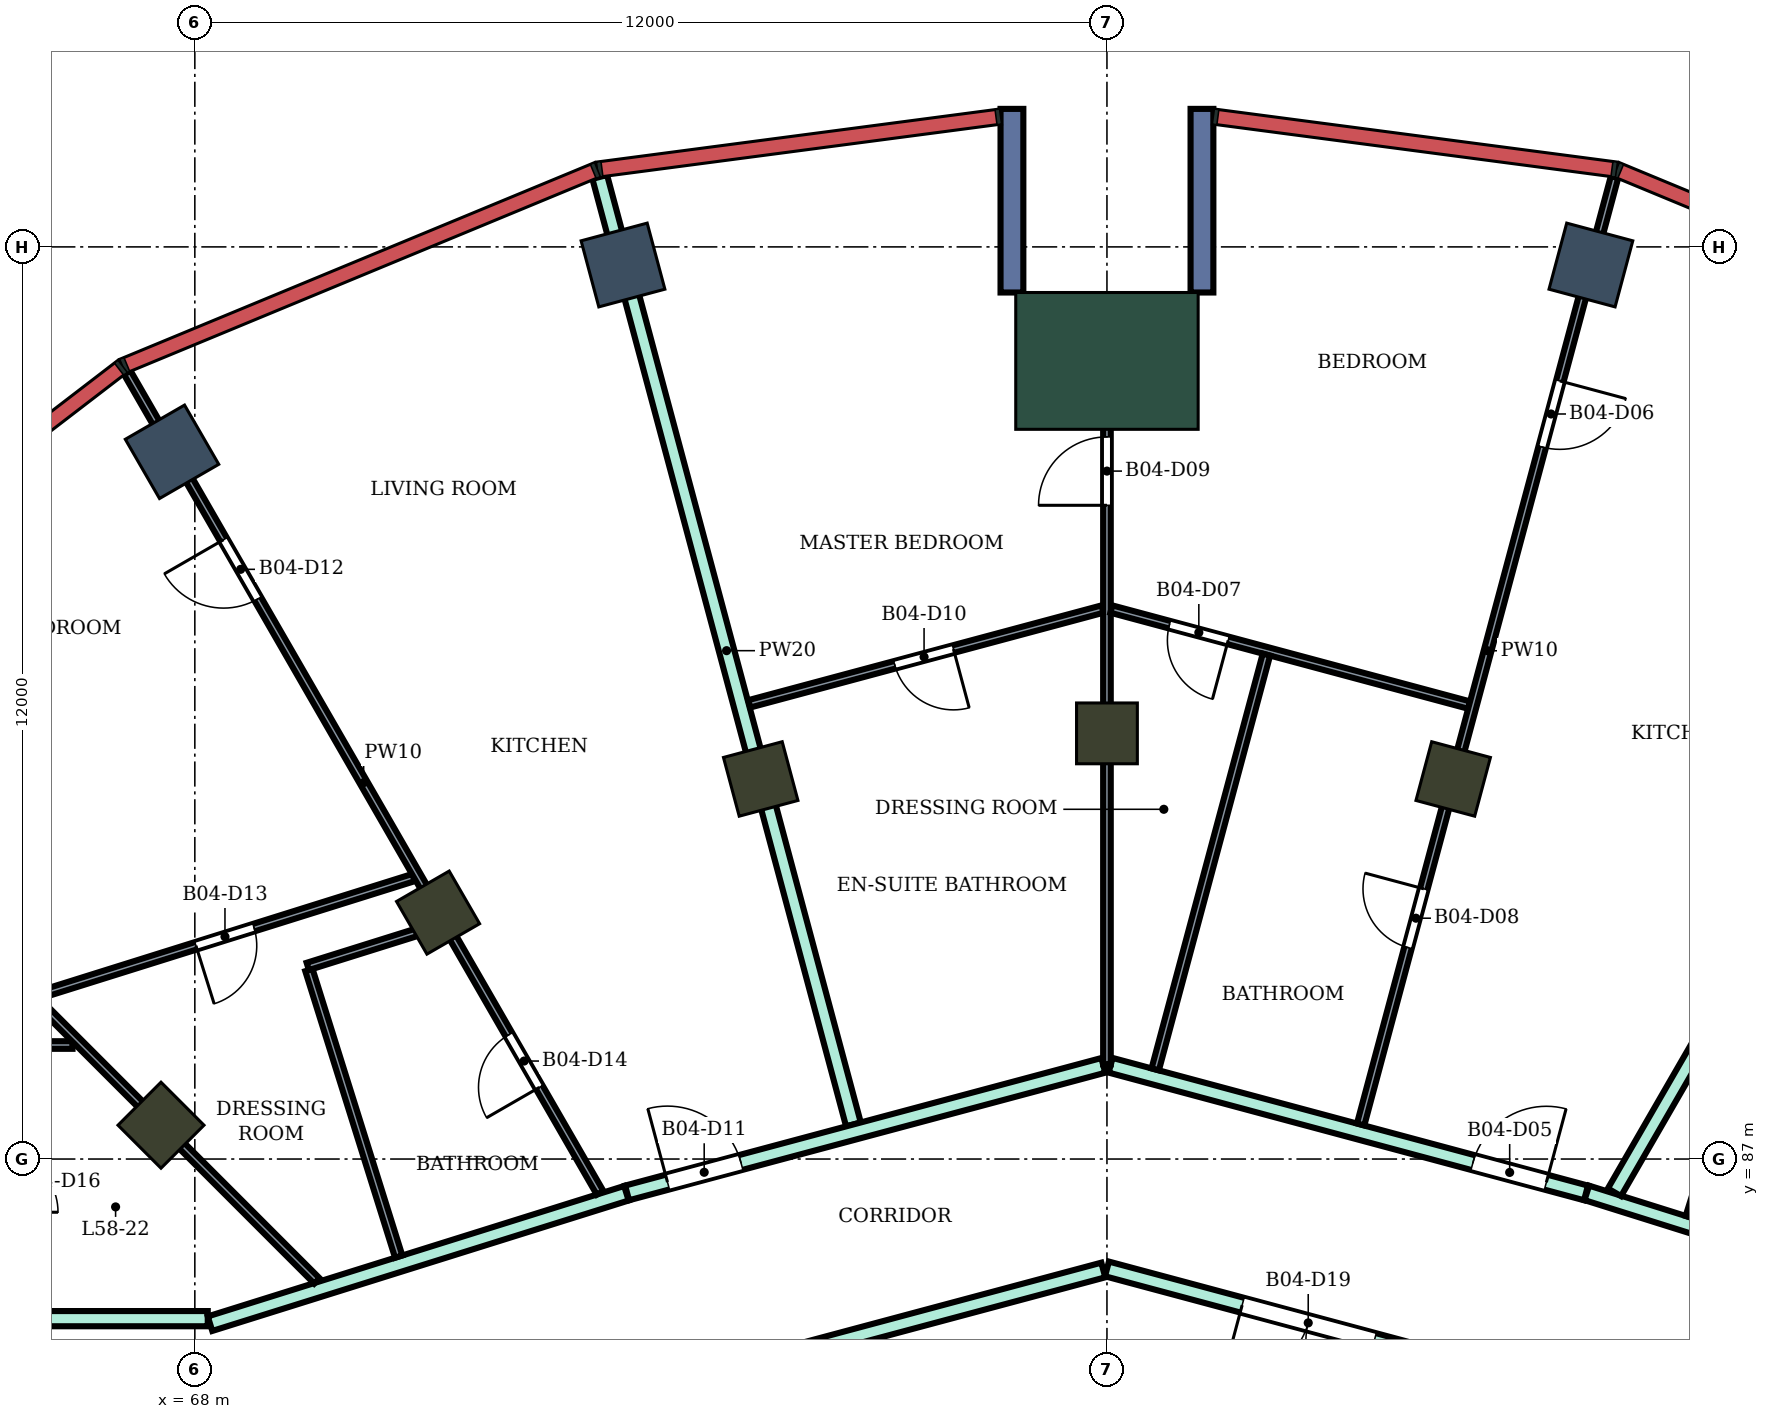
"""IFC4 building model, lengths in metres.
Left out: names, types, materials, properties, quantities, classifications, styles, units other than length and angle.
Written with IfcOpenShell. Run it as: python <this file> out.ifc"""

import sys

from ifc_helpers import new_model, si_unit, direction, frame, frame_2d, origin, origin_2d, place, context, subcontext, project, spatial, rectangle, extrude, element, fill, save


model = new_model("IFC4")
c1 = context("Model", 3, precision=1e-05, world=origin(), true_north=direction((0.0, 1.0)))
c2 = subcontext(c1, "Body", "Model", "MODEL_VIEW")
j1 = project(units=[si_unit("LENGTHUNIT", "METRE"), si_unit("PLANEANGLEUNIT", "RADIAN")], contexts=[c1])
p1 = place(None, origin())
s1 = spatial("IfcSite", under=j1, at=p1, CompositionType="ELEMENT")
p2 = place(p1, origin())
s2 = spatial("IfcBuilding", under=s1, at=p2, CompositionType="ELEMENT")
p3 = place(p2, frame((0.0, 0.0, 254.1)))
s3 = spatial("IfcBuildingStorey", under=s2, at=p3, CompositionType="ELEMENT", Elevation=254.1)
for number, where, z_axis, x_axis in (
    (1, (86.367, 98.762, 0.0), (0.0, 0.0, 1.0), (0.259, 0.966, 0.0)),
    (2, (73.633, 98.762, 0.0), (0.0, 0.0, 1.0), (-0.259, 0.966, 0.0)),
    (3, (67.7, 96.304, 0.0), (0.0, 0.0, 1.0), (-0.5, 0.866, 0.0)),
):
    element("IfcColumn", number, at=place(p3, frame(where, z_axis=z_axis, x_axis=x_axis)), inside=s3, PredefinedType="COLUMN", context=c2, shape_type="SweptSolid", body=[
        extrude(rectangle(XDim=0.9, YDim=0.9, at=origin_2d()), origin(), (0.0, 0.0, 1.0), 4.2),
    ])
for number, where, z_axis, x_axis in (
    (4, (84.555, 92.0, 0.0), (0.0, 0.0, 1.0), (0.259, 0.966, 0.0)),
    (5, (80.0, 92.6, 0.0), (0.0, 0.0, 1.0), (0.0, 1.0, 0.0)),
    (6, (75.445, 92.0, 0.0), (0.0, 0.0, 1.0), (-0.259, 0.966, 0.0)),
    (7, (71.2, 90.242, 0.0), (0.0, 0.0, 1.0), (-0.5, 0.866, 0.0)),
    (8, (67.555, 87.445, 0.0), (0.0, 0.0, 1.0), (-0.707, 0.707, 0.0)),
):
    element("IfcColumn", number, at=place(p3, frame(where, z_axis=z_axis, x_axis=x_axis)), inside=s3, PredefinedType="COLUMN", context=c2, shape_type="SweptSolid", body=[
        extrude(rectangle(XDim=0.8, YDim=0.8, at=origin_2d()), origin(), (0.0, 0.0, 1.0), 4.2),
    ])
p4 = place(p3, frame((80.0, 97.5, 0.0), z_axis=(0.0, 0.0, 1.0), x_axis=(0.0, 1.0, 0.0)))
e9 = element("IfcColumn", 9, at=p4, inside=s3, PredefinedType="COLUMN", context=c2, shape_type="SweptSolid", body=[
    extrude(rectangle(XDim=1.8, YDim=2.4, at=origin_2d()), origin(), (0.0, 0.0, 1.0), 4.2),
])
for number, where, z_axis, x_axis in (
    (10, (81.25, 98.4, 0.0), (0.0, 0.0, 1.0), (0.0, 1.0, 0.0)),
    (11, (78.75, 98.4, 0.0), (0.0, 0.0, 1.0), (0.0, 1.0, 0.0)),
):
    element("IfcWall", number, at=place(p3, frame(where, z_axis=z_axis, x_axis=x_axis)), inside=s3, PredefinedType="NOTDEFINED", context=c2, shape_type="SweptSolid", body=[
        extrude(rectangle(XDim=2.416, YDim=0.3, at=frame_2d((1.208, 0.0))), origin(), (0.0, 0.0, 1.0), 4.2),
    ])
p5 = place(p3, frame((65.2, 84.9, 0.0), z_axis=(0.0, 0.0, 1.0), x_axis=(1.0, 0.0, 0.0)))
e12 = element("IfcWall", 12, at=p5, inside=s3, PredefinedType="PARTITIONING", context=c2, shape_type="SweptSolid", body=[
    extrude(rectangle(XDim=2.97, YDim=0.2, at=frame_2d((1.485, 0.0))), origin(), (0.0, 0.0, 1.0), 3.75),
])
p6 = place(p3, frame((68.2, 84.834, 0.0), z_axis=(0.0, 0.0, 1.0), x_axis=(0.954260265251, 0.298977166624, 0.0)))
e13 = element("IfcWall", 13, at=p6, inside=s3, PredefinedType="PARTITIONING", context=c2, shape_type="SweptSolid", body=[
    extrude(rectangle(XDim=5.741, YDim=0.2, at=frame_2d((2.87, 0.0))), origin(), (0.0, 0.0, 1.0), 3.75),
])
p7 = place(p3, frame((73.327, 99.92, 0.0), z_axis=(0.0, 0.0, 1.0), x_axis=(0.258652861824, -0.965970339643, 0.0)))
e14 = element("IfcWall", 14, at=p7, inside=s3, PredefinedType="PARTITIONING", context=c2, shape_type="SweptSolid", body=[
    extrude(rectangle(XDim=12.904, YDim=0.2, at=frame_2d((6.452, 0.0))), origin(), (0.0, 0.0, 1.0), 3.75),
])
p8 = place(p3, frame((73.687, 86.554, 0.0), z_axis=(0.0, 0.0, 1.0), x_axis=(0.965961994098, 0.258684027257, 0.0)))
e15 = element("IfcWall", 15, at=p8, inside=s3, PredefinedType="PARTITIONING", context=c2, shape_type="SweptSolid", body=[
    extrude(rectangle(XDim=6.486, YDim=0.2, at=frame_2d((3.243, 0.0))), origin(), (0.0, 0.0, 1.0), 3.75),
])
p9 = place(p8, frame((0.55, 0.0, 0.0)))
e16 = element("IfcOpeningElement", 16, at=p9, cuts=e15, PredefinedType="OPENING", context=c2, shape_type="SweptSolid", body=[
    extrude(rectangle(XDim=1.0, YDim=2.1, at=frame_2d((0.5, 1.05))), frame((0.0, 0.11, 0.0), z_axis=(0.0, -1.0, 0.0), x_axis=(1.0, 0.0, 0.0)), (0.0, 0.0, 1.0), 0.22),
])
p10 = place(p3, frame((74.413, 84.057, 0.0), z_axis=(0.0, 0.0, 1.0), x_axis=(0.965970849692, 0.258650956976, 0.0)))
e17 = element("IfcWall", 17, at=p10, inside=s3, PredefinedType="PARTITIONING", context=c2, shape_type="SweptSolid", body=[
    extrude(rectangle(XDim=5.734, YDim=0.2, at=frame_2d((2.867, 0.0))), origin(), (0.0, 0.0, 1.0), 3.75),
])
p11 = place(p3, frame((80.0, 85.554, 0.0), z_axis=(0.0, 0.0, 1.0), x_axis=(0.965894438951, -0.258936155845, 0.0)))
e18 = element("IfcWall", 18, at=p11, inside=s3, PredefinedType="PARTITIONING", context=c2, shape_type="SweptSolid", body=[
    extrude(rectangle(XDim=5.774, YDim=0.2, at=frame_2d((2.887, 0.0))), origin(), (0.0, 0.0, 1.0), 3.75),
])
p12 = place(p11, frame((1.841, 0.0, 0.0)))
e19 = element("IfcOpeningElement", 19, at=p12, cuts=e18, PredefinedType="OPENING", context=c2, shape_type="SweptSolid", body=[
    extrude(rectangle(XDim=1.8, YDim=2.1, at=frame_2d((0.9, 1.05))), frame((0.0, 0.11, 0.0), z_axis=(0.0, -1.0, 0.0), x_axis=(1.0, 0.0, 0.0)), (0.0, 0.0, 1.0), 0.22),
])
p13 = place(p3, frame((80.048, 88.233, 0.0), z_axis=(0.0, 0.0, 1.0), x_axis=(0.965787353661, -0.259335280109, 0.0)))
e20 = element("IfcWall", 20, at=p13, inside=s3, PredefinedType="PARTITIONING", context=c2, shape_type="SweptSolid", body=[
    extrude(rectangle(XDim=6.476, YDim=0.2, at=frame_2d((3.238, 0.0))), origin(), (0.0, 0.0, 1.0), 3.75),
])
p14 = place(p13, frame((4.936, 0.0, 0.0)))
e21 = element("IfcOpeningElement", 21, at=p14, cuts=e20, PredefinedType="OPENING", context=c2, shape_type="SweptSolid", body=[
    extrude(rectangle(XDim=1.0, YDim=2.1, at=frame_2d((0.5, 1.05))), frame((0.0, 0.11, 0.0), z_axis=(0.0, -1.0, 0.0), x_axis=(1.0, 0.0, 0.0)), (0.0, 0.0, 1.0), 0.22),
])
p15 = place(p3, frame((86.313, 86.554, 0.0), z_axis=(0.0, 0.0, 1.0), x_axis=(0.954077387881, -0.29956024091, 0.0)))
e22 = element("IfcWall", 22, at=p15, inside=s3, PredefinedType="PARTITIONING", context=c2, shape_type="SweptSolid", body=[
    extrude(rectangle(XDim=5.72, YDim=0.2, at=frame_2d((2.86, 0.0))), origin(), (0.0, 0.0, 1.0), 3.75),
])
p16 = place(p3, frame((86.677, 86.562, 0.0), z_axis=(0.0, 0.0, 1.0), x_axis=(0.500139020429, 0.865945125424, 0.0)))
e23 = element("IfcWall", 23, at=p16, inside=s3, PredefinedType="PARTITIONING", context=c2, shape_type="SweptSolid", body=[
    extrude(rectangle(XDim=12.446, YDim=0.2, at=frame_2d((6.223, 0.0))), origin(), (0.0, 0.0, 1.0), 3.75),
])
p17 = place(p3, frame((58.072, 88.5, 0.0), z_axis=(0.0, 0.0, 1.0), x_axis=(1.0, 0.0, 0.0)))
e24 = element("IfcWall", 24, at=p17, inside=s3, PredefinedType="PARTITIONING", context=c2, shape_type="SweptSolid", body=[
    extrude(rectangle(XDim=8.319, YDim=0.1, at=frame_2d((4.159, 0.0))), origin(), (0.0, 0.0, 1.0), 3.75),
])
p18 = place(p17, frame((3.329, 0.0, 0.0)))
e25 = element("IfcOpeningElement", 25, at=p18, cuts=e24, PredefinedType="OPENING", context=c2, shape_type="SweptSolid", body=[
    extrude(rectangle(XDim=0.8, YDim=2.1, at=frame_2d((0.4, 1.05))), frame((0.0, 0.06, 0.0), z_axis=(0.0, -1.0, 0.0), x_axis=(1.0, 0.0, 0.0)), (0.0, 0.0, 1.0), 0.12),
])
p19 = place(p3, frame((63.597, 91.407, 0.0), z_axis=(0.0, 0.0, 1.0), x_axis=(0.70700623685, -0.707207311228, 0.0)))
e26 = element("IfcWall", 26, at=p19, inside=s3, PredefinedType="PARTITIONING", context=c2, shape_type="SweptSolid", body=[
    extrude(rectangle(XDim=8.499, YDim=0.1, at=frame_2d((4.25, 0.0))), origin(), (0.0, 0.0, 1.0), 3.75),
])
p20 = place(p19, frame((1.632, 0.0, 0.0)))
e27 = element("IfcOpeningElement", 27, at=p20, cuts=e26, PredefinedType="OPENING", context=c2, shape_type="SweptSolid", body=[
    extrude(rectangle(XDim=0.9, YDim=2.1, at=frame_2d((0.45, 1.05))), frame((0.0, 0.06, 0.0), z_axis=(0.0, -1.0, 0.0), x_axis=(1.0, 0.0, 0.0)), (0.0, 0.0, 1.0), 0.12),
])
p21 = place(p3, frame((65.944, 89.157, 0.0), z_axis=(0.0, 0.0, 1.0), x_axis=(0.954238484697, 0.299046675828, 0.0)))
e28 = element("IfcWall", 28, at=p21, inside=s3, PredefinedType="PARTITIONING", context=c2, shape_type="SweptSolid", body=[
    extrude(rectangle(XDim=5.169, YDim=0.1, at=frame_2d((2.585, 0.0))), origin(), (0.0, 0.0, 1.0), 3.75),
])
p22 = place(p21, frame((2.17, 0.0, 0.0)))
e29 = element("IfcOpeningElement", 29, at=p22, cuts=e28, PredefinedType="OPENING", context=c2, shape_type="SweptSolid", body=[
    extrude(rectangle(XDim=0.8, YDim=2.1, at=frame_2d((0.4, 1.05))), frame((0.0, 0.06, 0.0), z_axis=(0.0, -1.0, 0.0), x_axis=(1.0, 0.0, 0.0)), (0.0, 0.0, 1.0), 0.12),
])
p23 = place(p3, frame((67.111, 97.347, 0.0), z_axis=(0.0, 0.0, 1.0), x_axis=(0.499428303955, -0.866355221147, 0.0)))
e30 = element("IfcWall", 30, at=p23, inside=s3, PredefinedType="PARTITIONING", context=c2, shape_type="SweptSolid", body=[
    extrude(rectangle(XDim=12.456, YDim=0.1, at=frame_2d((6.228, 0.0))), origin(), (0.0, 0.0, 1.0), 3.75),
])
p24 = place(p23, frame((2.538, 0.0, 0.0)))
e31 = element("IfcOpeningElement", 31, at=p24, cuts=e30, PredefinedType="OPENING", context=c2, shape_type="SweptSolid", body=[
    extrude(rectangle(XDim=0.9, YDim=2.1, at=frame_2d((0.45, 1.05))), frame((0.0, 0.06, 0.0), z_axis=(0.0, -1.0, 0.0), x_axis=(1.0, 0.0, 0.0)), (0.0, 0.0, 1.0), 0.12),
])
p25 = place(p23, frame((10.055, 0.0, 0.0)))
e32 = element("IfcOpeningElement", 32, at=p25, cuts=e30, PredefinedType="OPENING", context=c2, shape_type="SweptSolid", body=[
    extrude(rectangle(XDim=0.8, YDim=2.1, at=frame_2d((0.4, 1.05))), frame((0.0, 0.06, 0.0), z_axis=(0.0, -1.0, 0.0), x_axis=(1.0, 0.0, 0.0)), (0.0, 0.0, 1.0), 0.12),
])
p26 = place(p3, frame((69.501, 89.486, 0.0), z_axis=(0.0, 0.0, 1.0), x_axis=(0.298971609069, -0.954262006459, 0.0)))
e33 = element("IfcWall", 33, at=p26, inside=s3, PredefinedType="PARTITIONING", context=c2, shape_type="SweptSolid", body=[
    extrude(rectangle(XDim=3.951, YDim=0.1, at=frame_2d((1.975, 0.0))), origin(), (0.0, 0.0, 1.0), 3.75),
])
p27 = place(p3, frame((69.486, 89.534, 0.0), z_axis=(0.0, 0.0, 1.0), x_axis=(0.954254575134, 0.298995327449, 0.0)))
e34 = element("IfcWall", 34, at=p27, inside=s3, PredefinedType="PARTITIONING", context=c2, shape_type="SweptSolid", body=[
    extrude(rectangle(XDim=1.833, YDim=0.1, at=frame_2d((0.917, 0.0))), origin(), (0.0, 0.0, 1.0), 3.75),
])
p28 = place(p3, frame((75.294, 92.989, 0.0), z_axis=(0.0, 0.0, 1.0), x_axis=(0.965836333205, 0.259152807165, 0.0)))
e35 = element("IfcWall", 35, at=p28, inside=s3, PredefinedType="PARTITIONING", context=c2, shape_type="SweptSolid", body=[
    extrude(rectangle(XDim=4.812, YDim=0.1, at=frame_2d((2.406, 0.0))), origin(), (0.0, 0.0, 1.0), 3.75),
])
p29 = place(p28, frame((1.981, 0.0, 0.0)))
e36 = element("IfcOpeningElement", 36, at=p29, cuts=e35, PredefinedType="OPENING", context=c2, shape_type="SweptSolid", body=[
    extrude(rectangle(XDim=0.8, YDim=2.1, at=frame_2d((0.4, 1.05))), frame((0.0, 0.06, 0.0), z_axis=(0.0, -1.0, 0.0), x_axis=(1.0, 0.0, 0.0)), (0.0, 0.0, 1.0), 0.12),
])
p30 = place(p3, frame((80.0, 88.246, 0.0), z_axis=(0.0, 0.0, 1.0), x_axis=(0.0, 1.0, 0.0)))
e37 = element("IfcWall", 37, at=p30, inside=s3, PredefinedType="PARTITIONING", context=c2, shape_type="SweptSolid", body=[
    extrude(rectangle(XDim=9.954, YDim=0.1, at=frame_2d((4.977, 0.0))), origin(), (0.0, 0.0, 1.0), 3.75),
])
p31 = place(p30, frame((7.354, 0.0, 0.0)))
e38 = element("IfcOpeningElement", 38, at=p31, cuts=e37, PredefinedType="OPENING", context=c2, shape_type="SweptSolid", body=[
    extrude(rectangle(XDim=0.9, YDim=2.1, at=frame_2d((0.45, 1.05))), frame((0.0, 0.06, 0.0), z_axis=(0.0, -1.0, 0.0), x_axis=(1.0, 0.0, 0.0)), (0.0, 0.0, 1.0), 0.12),
])
p32 = place(p3, frame((80.058, 94.235, 0.0), z_axis=(0.0, 0.0, 1.0), x_axis=(0.965831212389, -0.259171891173, 0.0)))
e39 = element("IfcWall", 39, at=p32, inside=s3, PredefinedType="PARTITIONING", context=c2, shape_type="SweptSolid", body=[
    extrude(rectangle(XDim=4.872, YDim=0.1, at=frame_2d((2.436, 0.0))), origin(), (0.0, 0.0, 1.0), 3.75),
])
p33 = place(p32, frame((0.792, 0.0, 0.0)))
e40 = element("IfcOpeningElement", 40, at=p33, cuts=e39, PredefinedType="OPENING", context=c2, shape_type="SweptSolid", body=[
    extrude(rectangle(XDim=0.8, YDim=2.1, at=frame_2d((0.4, 1.05))), frame((0.0, 0.06, 0.0), z_axis=(0.0, -1.0, 0.0), x_axis=(1.0, 0.0, 0.0)), (0.0, 0.0, 1.0), 0.12),
])
p34 = place(p3, frame((80.635, 88.179, 0.0), z_axis=(0.0, 0.0, 1.0), x_axis=(0.258942728312, 0.965892676986, 0.0)))
e41 = element("IfcWall", 41, at=p34, inside=s3, PredefinedType="PARTITIONING", context=c2, shape_type="SweptSolid", body=[
    extrude(rectangle(XDim=5.649, YDim=0.1, at=frame_2d((2.825, 0.0))), origin(), (0.0, 0.0, 1.0), 3.75),
])
p35 = place(p3, frame((83.338, 87.455, 0.0), z_axis=(0.0, 0.0, 1.0), x_axis=(0.25886596283, 0.965913253501, 0.0)))
e42 = element("IfcWall", 42, at=p35, inside=s3, PredefinedType="PARTITIONING", context=c2, shape_type="SweptSolid", body=[
    extrude(rectangle(XDim=12.904, YDim=0.1, at=frame_2d((6.452, 0.0))), origin(), (0.0, 0.0, 1.0), 3.75),
])
p36 = place(p35, frame((9.227, 0.0, 0.0)))
e43 = element("IfcOpeningElement", 43, at=p36, cuts=e42, PredefinedType="OPENING", context=c2, shape_type="SweptSolid", body=[
    extrude(rectangle(XDim=0.9, YDim=2.1, at=frame_2d((0.45, 1.05))), frame((0.0, 0.06, 0.0), z_axis=(0.0, -1.0, 0.0), x_axis=(1.0, 0.0, 0.0)), (0.0, 0.0, 1.0), 0.12),
])
p37 = place(p35, frame((2.409, 0.0, 0.0)))
e44 = element("IfcOpeningElement", 44, at=p37, cuts=e42, PredefinedType="OPENING", context=c2, shape_type="SweptSolid", body=[
    extrude(rectangle(XDim=0.8, YDim=2.1, at=frame_2d((0.4, 1.05))), frame((0.0, 0.06, 0.0), z_axis=(0.0, -1.0, 0.0), x_axis=(1.0, 0.0, 0.0)), (0.0, 0.0, 1.0), 0.12),
])
p38 = place(p3, frame((87.661, 86.236, 0.0), z_axis=(0.0, 0.0, 1.0), x_axis=(0.299267255743, 0.954169329648, 0.0)))
e45 = element("IfcWall", 45, at=p38, inside=s3, PredefinedType="PARTITIONING", context=c2, shape_type="SweptSolid", body=[
    extrude(rectangle(XDim=3.95, YDim=0.1, at=frame_2d((1.975, 0.0))), origin(), (0.0, 0.0, 1.0), 3.75),
])
p39 = place(p14, origin())
e46 = element("IfcDoor", 46, at=p39, inside=s3, OperationType="SINGLE_SWING_RIGHT", PredefinedType="DOOR", context=c2, shape_type="SweptSolid", body=[
    extrude(rectangle(XDim=1.0, YDim=2.1, at=frame_2d((0.5, 1.05))), frame((0.0, 0.025, 0.0), z_axis=(0.0, -1.0, 0.0), x_axis=(1.0, 0.0, 0.0)), (0.0, 0.0, 1.0), 0.05),
])
fill(e21, e46)
p40 = place(p36, frame((0.9, 0.0, 0.0), z_axis=(0.0, 0.0, 1.0), x_axis=(-1.0, 0.0, 0.0)))
e47 = element("IfcDoor", 47, at=p40, inside=s3, OperationType="SINGLE_SWING_LEFT", PredefinedType="DOOR", context=c2, shape_type="SweptSolid", body=[
    extrude(rectangle(XDim=0.9, YDim=2.1, at=frame_2d((0.45, 1.05))), frame((0.0, 0.025, 0.0), z_axis=(0.0, -1.0, 0.0), x_axis=(1.0, 0.0, 0.0)), (0.0, 0.0, 1.0), 0.05),
])
fill(e43, e47)
p41 = place(p33, frame((0.8, 0.0, 0.0), z_axis=(0.0, 0.0, 1.0), x_axis=(-1.0, 0.0, 0.0)))
e48 = element("IfcDoor", 48, at=p41, inside=s3, OperationType="SINGLE_SWING_LEFT", PredefinedType="DOOR", context=c2, shape_type="SweptSolid", body=[
    extrude(rectangle(XDim=0.8, YDim=2.1, at=frame_2d((0.4, 1.05))), frame((0.0, 0.025, 0.0), z_axis=(0.0, -1.0, 0.0), x_axis=(1.0, 0.0, 0.0)), (0.0, 0.0, 1.0), 0.05),
])
fill(e40, e48)
p42 = place(p37, origin())
e49 = element("IfcDoor", 49, at=p42, inside=s3, OperationType="SINGLE_SWING_RIGHT", PredefinedType="DOOR", context=c2, shape_type="SweptSolid", body=[
    extrude(rectangle(XDim=0.8, YDim=2.1, at=frame_2d((0.4, 1.05))), frame((0.0, 0.025, 0.0), z_axis=(0.0, -1.0, 0.0), x_axis=(1.0, 0.0, 0.0)), (0.0, 0.0, 1.0), 0.05),
])
fill(e44, e49)
p43 = place(p31, origin())
e50 = element("IfcDoor", 50, at=p43, inside=s3, OperationType="SINGLE_SWING_LEFT", PredefinedType="DOOR", context=c2, shape_type="SweptSolid", body=[
    extrude(rectangle(XDim=0.9, YDim=2.1, at=frame_2d((0.45, 1.05))), frame((0.0, 0.025, 0.0), z_axis=(0.0, -1.0, 0.0), x_axis=(1.0, 0.0, 0.0)), (0.0, 0.0, 1.0), 0.05),
])
fill(e38, e50)
p44 = place(p29, frame((0.8, 0.0, 0.0), z_axis=(0.0, 0.0, 1.0), x_axis=(-1.0, 0.0, 0.0)))
e51 = element("IfcDoor", 51, at=p44, inside=s3, OperationType="SINGLE_SWING_LEFT", PredefinedType="DOOR", context=c2, shape_type="SweptSolid", body=[
    extrude(rectangle(XDim=0.8, YDim=2.1, at=frame_2d((0.4, 1.05))), frame((0.0, 0.025, 0.0), z_axis=(0.0, -1.0, 0.0), x_axis=(1.0, 0.0, 0.0)), (0.0, 0.0, 1.0), 0.05),
])
fill(e36, e51)
p45 = place(p9, origin())
e52 = element("IfcDoor", 52, at=p45, inside=s3, OperationType="SINGLE_SWING_LEFT", PredefinedType="DOOR", context=c2, shape_type="SweptSolid", body=[
    extrude(rectangle(XDim=1.0, YDim=2.1, at=frame_2d((0.5, 1.05))), frame((0.0, 0.025, 0.0), z_axis=(0.0, -1.0, 0.0), x_axis=(1.0, 0.0, 0.0)), (0.0, 0.0, 1.0), 0.05),
])
fill(e16, e52)
p46 = place(p24, frame((0.9, 0.0, 0.0), z_axis=(0.0, 0.0, 1.0), x_axis=(-1.0, 0.0, 0.0)))
e53 = element("IfcDoor", 53, at=p46, inside=s3, OperationType="SINGLE_SWING_RIGHT", PredefinedType="DOOR", context=c2, shape_type="SweptSolid", body=[
    extrude(rectangle(XDim=0.9, YDim=2.1, at=frame_2d((0.45, 1.05))), frame((0.0, 0.025, 0.0), z_axis=(0.0, -1.0, 0.0), x_axis=(1.0, 0.0, 0.0)), (0.0, 0.0, 1.0), 0.05),
])
fill(e31, e53)
p47 = place(p22, frame((0.8, 0.0, 0.0), z_axis=(0.0, 0.0, 1.0), x_axis=(-1.0, 0.0, 0.0)))
e54 = element("IfcDoor", 54, at=p47, inside=s3, OperationType="SINGLE_SWING_RIGHT", PredefinedType="DOOR", context=c2, shape_type="SweptSolid", body=[
    extrude(rectangle(XDim=0.8, YDim=2.1, at=frame_2d((0.4, 1.05))), frame((0.0, 0.025, 0.0), z_axis=(0.0, -1.0, 0.0), x_axis=(1.0, 0.0, 0.0)), (0.0, 0.0, 1.0), 0.05),
])
fill(e29, e54)
p48 = place(p25, frame((0.8, 0.0, 0.0), z_axis=(0.0, 0.0, 1.0), x_axis=(-1.0, 0.0, 0.0)))
e55 = element("IfcDoor", 55, at=p48, inside=s3, OperationType="SINGLE_SWING_LEFT", PredefinedType="DOOR", context=c2, shape_type="SweptSolid", body=[
    extrude(rectangle(XDim=0.8, YDim=2.1, at=frame_2d((0.4, 1.05))), frame((0.0, 0.025, 0.0), z_axis=(0.0, -1.0, 0.0), x_axis=(1.0, 0.0, 0.0)), (0.0, 0.0, 1.0), 0.05),
])
fill(e32, e55)
p49 = place(p12, frame((1.8, 0.0, 0.0), z_axis=(0.0, 0.0, 1.0), x_axis=(-1.0, 0.0, 0.0)))
e56 = element("IfcDoor", 56, at=p49, inside=s3, OperationType="DOUBLE_DOOR_SINGLE_SWING", PredefinedType="DOOR", context=c2, shape_type="SweptSolid", body=[
    extrude(rectangle(XDim=1.8, YDim=2.1, at=frame_2d((0.9, 1.05))), frame((0.0, 0.025, 0.0), z_axis=(0.0, -1.0, 0.0), x_axis=(1.0, 0.0, 0.0)), (0.0, 0.0, 1.0), 0.05),
])
fill(e19, e56)
save(model, sys.argv[1])
